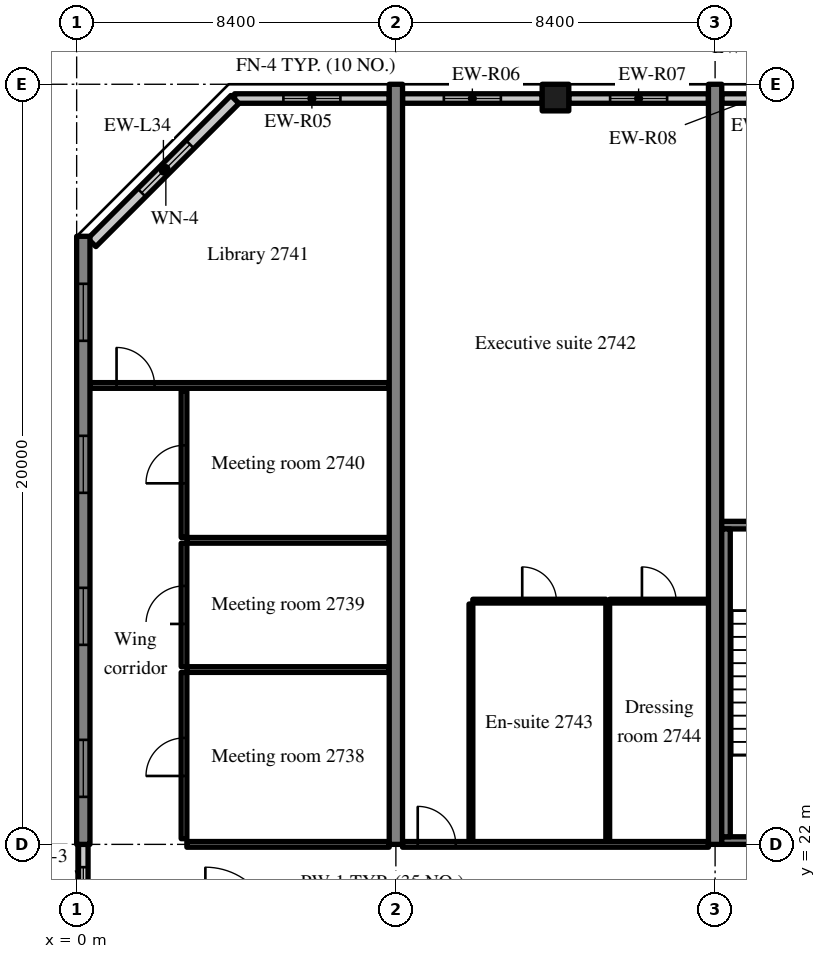
"""IFC4 building model, lengths in metres.
Left out: names, types, materials, properties, quantities, classifications, styles, units other than length and angle.
Written with IfcOpenShell. Run it as: python <this file> out.ifc"""

import sys

from ifc_helpers import new_model, si_unit, direction, frame, frame_2d, origin, origin_2d, place, context, subcontext, project, spatial, rectangle, extrude, source, transform, mapped, element, fill, save


model = new_model("IFC4")
c1 = context("Model", 3, precision=1e-05, world=origin(), true_north=direction((0.0, 1.0)))
c2 = subcontext(c1, "Body", "Model", "MODEL_VIEW")
j1 = project(units=[si_unit("LENGTHUNIT", "METRE"), si_unit("PLANEANGLEUNIT", "RADIAN")], contexts=[c1])
p1 = place(None, origin())
s1 = spatial("IfcSite", under=j1, at=p1, CompositionType="ELEMENT")
p2 = place(p1, origin())
s2 = spatial("IfcBuilding", under=s1, at=p2, CompositionType="ELEMENT")
p3 = place(p2, frame((0.0, 0.0, 114.2)))
s3 = spatial("IfcBuildingStorey", under=s2, at=p3, CompositionType="ELEMENT", Elevation=114.2)
m1 = source(origin(), c2, "Body", "SweptSolid", [
    extrude(rectangle(XDim=16.0, YDim=0.35, at=frame_2d((8.0, 0.0))), origin(), (0.0, 0.0, 1.0), 3.52),
])
p4 = place(p3, frame((0.175, 22.0, 0.0), z_axis=(0.0, 0.0, 1.0), x_axis=(0.0, 1.0, 0.0)))
e1 = element("IfcWall", 1, at=p4, inside=s3, PredefinedType="SHEAR", context=c2, shape_type="MappedRepresentation", body=[
    mapped(m1, transform((0.0, 0.0, 0.0), scale=1.0)),
])
m2 = source(origin(), c2, "Body", "SweptSolid", [
    extrude(rectangle(XDim=1.5, YDim=1.5, at=frame_2d((0.75, 0.75))), frame((0.0, 0.185, 0.0), z_axis=(0.0, -1.0, 0.0), x_axis=(1.0, 0.0, 0.0)), (0.0, 0.0, 1.0), 0.37),
])
p5 = place(p4, frame((1.25, 0.0, 0.9)))
e2 = element("IfcOpeningElement", 2, at=p5, cuts=e1, PredefinedType="OPENING", context=c2, shape_type="MappedRepresentation", body=[
    mapped(m2, transform((0.0, 0.0, 0.0), scale=1.0)),
])
p6 = place(p4, frame((5.25, 0.0, 0.9)))
e3 = element("IfcOpeningElement", 3, at=p6, cuts=e1, PredefinedType="OPENING", context=c2, shape_type="MappedRepresentation", body=[
    mapped(m2, transform((0.0, 0.0, 0.0), scale=1.0)),
])
p7 = place(p4, frame((9.25, 0.0, 0.9)))
e4 = element("IfcOpeningElement", 4, at=p7, cuts=e1, PredefinedType="OPENING", context=c2, shape_type="MappedRepresentation", body=[
    mapped(m2, transform((0.0, 0.0, 0.0), scale=1.0)),
])
p8 = place(p4, frame((13.25, 0.0, 0.9)))
e5 = element("IfcOpeningElement", 5, at=p8, cuts=e1, PredefinedType="OPENING", context=c2, shape_type="MappedRepresentation", body=[
    mapped(m2, transform((0.0, 0.0, 0.0), scale=1.0)),
])
m3 = source(origin(), c2, "Body", "SweptSolid", [
    extrude(rectangle(XDim=20.0, YDim=0.35, at=frame_2d((10.0, 0.0))), origin(), (0.0, 0.0, 1.0), 3.52),
])
for number, where, z_axis, x_axis in (
    (6, (8.4, 22.0, 0.0), (0.0, 0.0, 1.0), (0.0, 1.0, 0.0)),
    (7, (16.8, 22.0, 0.0), (0.0, 0.0, 1.0), (0.0, 1.0, 0.0)),
):
    element("IfcWall", number, at=place(p3, frame(where, z_axis=z_axis, x_axis=x_axis)), inside=s3, PredefinedType="SHEAR", context=c2, shape_type="MappedRepresentation", body=[
        mapped(m3, transform((0.0, 0.0, 0.0), scale=1.0)),
    ])
m4 = source(origin(), c2, "Body", "SweptSolid", [
    extrude(rectangle(XDim=0.7, YDim=0.7, at=origin_2d()), origin(), (0.0, 0.0, 1.0), 3.52),
])
p9 = place(p3, frame((12.6, 41.65, 0.0), z_axis=(0.0, 0.0, 1.0), x_axis=(1.0, 0.0, 0.0)))
e8 = element("IfcColumn", 8, at=p9, inside=s3, PredefinedType="COLUMN", context=c2, shape_type="MappedRepresentation", body=[
    mapped(m4, transform((0.0, 0.0, 0.0), scale=1.0)),
])
m5 = source(origin(), c2, "Body", "SweptSolid", [
    extrude(rectangle(XDim=4.07, YDim=0.25, at=frame_2d((2.035, 0.0))), origin(), (0.0, 0.0, 1.0), 2.82),
])
p10 = place(p3, frame((8.225, 41.625, 0.0), z_axis=(0.0, 0.0, 1.0), x_axis=(-1.0, 0.0, 0.0)))
e9 = element("IfcWall", 9, at=p10, inside=s3, PredefinedType="SOLIDWALL", context=c2, shape_type="MappedRepresentation", body=[
    mapped(m5, transform((0.0, 0.0, 0.0), scale=1.0)),
])
m6 = source(origin(), c2, "Body", "SweptSolid", [
    extrude(rectangle(XDim=1.5, YDim=1.5, at=frame_2d((0.75, 0.75))), frame((0.0, 0.135, 0.0), z_axis=(0.0, -1.0, 0.0), x_axis=(1.0, 0.0, 0.0)), (0.0, 0.0, 1.0), 0.27),
])
p11 = place(p10, frame((1.285, 0.0, 0.9)))
e10 = element("IfcOpeningElement", 10, at=p11, cuts=e9, PredefinedType="OPENING", context=c2, shape_type="MappedRepresentation", body=[
    mapped(m6, transform((0.0, 0.0, 0.0), scale=1.0)),
])
m7 = source(origin(), c2, "Body", "SweptSolid", [
    extrude(rectangle(XDim=3.675, YDim=0.25, at=frame_2d((1.837, 0.0))), origin(), (0.0, 0.0, 1.0), 2.82),
])
p12 = place(p3, frame((12.25, 41.625, 0.0), z_axis=(0.0, 0.0, 1.0), x_axis=(-1.0, 0.0, 0.0)))
e11 = element("IfcWall", 11, at=p12, inside=s3, PredefinedType="SOLIDWALL", context=c2, shape_type="MappedRepresentation", body=[
    mapped(m7, transform((0.0, 0.0, 0.0), scale=1.0)),
])
p13 = place(p12, frame((1.087, 0.0, 0.9)))
e12 = element("IfcOpeningElement", 12, at=p13, cuts=e11, PredefinedType="OPENING", context=c2, shape_type="MappedRepresentation", body=[
    mapped(m6, transform((0.0, 0.0, 0.0), scale=1.0)),
])
p14 = place(p3, frame((16.625, 41.625, 0.0), z_axis=(0.0, 0.0, 1.0), x_axis=(-1.0, 0.0, 0.0)))
e13 = element("IfcWall", 13, at=p14, inside=s3, PredefinedType="SOLIDWALL", context=c2, shape_type="MappedRepresentation", body=[
    mapped(m7, transform((0.0, 0.0, 0.0), scale=1.0)),
])
p15 = place(p14, frame((1.087, 0.0, 0.9)))
e14 = element("IfcOpeningElement", 14, at=p15, cuts=e13, PredefinedType="OPENING", context=c2, shape_type="MappedRepresentation", body=[
    mapped(m6, transform((0.0, 0.0, 0.0), scale=1.0)),
])
m8 = source(origin(), c2, "Body", "SweptSolid", [
    extrude(rectangle(XDim=1.683, YDim=0.25, at=frame_2d((0.841, 0.0))), origin(), (0.0, 0.0, 1.0), 2.82),
])
p16 = place(p3, frame((18.658, 41.625, 0.0), z_axis=(0.0, 0.0, 1.0), x_axis=(-1.0, 0.0, 0.0)))
e15 = element("IfcWall", 15, at=p16, inside=s3, PredefinedType="SOLIDWALL", context=c2, shape_type="MappedRepresentation", body=[
    mapped(m8, transform((0.0, 0.0, 0.0), scale=1.0)),
])
m9 = source(origin(), c2, "Body", "SweptSolid", [
    extrude(rectangle(XDim=5.326, YDim=0.3, at=frame_2d((2.663, 0.0))), origin(), (0.0, 0.0, 1.0), 3.52),
])
p17 = place(p3, frame((4.166, 41.6, 0.0), z_axis=(0.0, 0.0, 1.0), x_axis=(-0.707106781187, -0.707106781187, 0.0)))
e16 = element("IfcWall", 16, at=p17, inside=s3, PredefinedType="SOLIDWALL", context=c2, shape_type="MappedRepresentation", body=[
    mapped(m9, transform((0.0, 0.0, 0.0), scale=1.0)),
])
m10 = source(origin(), c2, "Body", "SweptSolid", [
    extrude(rectangle(XDim=1.8, YDim=1.5, at=frame_2d((0.9, 0.75))), frame((0.0, 0.16, 0.0), z_axis=(0.0, -1.0, 0.0), x_axis=(1.0, 0.0, 0.0)), (0.0, 0.0, 1.0), 0.32),
])
p18 = place(p17, frame((1.672, 0.0, 0.9)))
e17 = element("IfcOpeningElement", 17, at=p18, cuts=e16, PredefinedType="OPENING", context=c2, shape_type="MappedRepresentation", body=[
    mapped(m10, transform((0.0, 0.0, 0.0), scale=1.0)),
])
m11 = source(origin(), c2, "Body", "SweptSolid", [
    extrude(rectangle(XDim=2.4, YDim=0.25, at=frame_2d((1.2, 0.0))), origin(), (0.0, 0.0, 1.0), 2.62),
])
p19 = place(p3, frame((0.175, 19.6, 0.0), z_axis=(0.0, 0.0, 1.0), x_axis=(0.0, 1.0, 0.0)))
e18 = element("IfcWall", 18, at=p19, inside=s3, PredefinedType="SOLIDWALL", context=c2, shape_type="MappedRepresentation", body=[
    mapped(m11, transform((0.0, 0.0, 0.0), scale=1.0)),
])
m12 = source(origin(), c2, "Body", "SweptSolid", [
    extrude(rectangle(XDim=1.2, YDim=1.5, at=frame_2d((0.6, 0.75))), frame((0.0, 0.135, 0.0), z_axis=(0.0, -1.0, 0.0), x_axis=(1.0, 0.0, 0.0)), (0.0, 0.0, 1.0), 0.27),
])
p20 = place(p19, frame((0.6, 0.0, 0.9)))
e19 = element("IfcOpeningElement", 19, at=p20, cuts=e18, PredefinedType="OPENING", context=c2, shape_type="MappedRepresentation", body=[
    mapped(m12, transform((0.0, 0.0, 0.0), scale=1.0)),
])
m13 = source(origin(), c2, "Body", "SweptSolid", [
    extrude(rectangle(XDim=8.225, YDim=0.2, at=frame_2d((4.112, 0.0))), origin(), (0.0, 0.0, 1.0), 3.52),
])
p21 = place(p3, frame((16.975, 22.1, 0.0), z_axis=(0.0, 0.0, 1.0), x_axis=(1.0, 0.0, 0.0)))
e20 = element("IfcWall", 20, at=p21, inside=s3, PredefinedType="SOLIDWALL", context=c2, shape_type="MappedRepresentation", body=[
    mapped(m13, transform((0.0, 0.0, 0.0), scale=1.0)),
])
m14 = source(origin(), c2, "Body", "SweptSolid", [
    extrude(rectangle(XDim=1.2, YDim=2.1, at=frame_2d((0.6, 1.05))), frame((0.0, 0.11, 0.0), z_axis=(0.0, -1.0, 0.0), x_axis=(1.0, 0.0, 0.0)), (0.0, 0.0, 1.0), 0.22),
])
p22 = place(p21, frame((6.025, 0.0, 0.0)))
e21 = element("IfcOpeningElement", 21, at=p22, cuts=e20, PredefinedType="OPENING", context=c2, shape_type="MappedRepresentation", body=[
    mapped(m14, transform((0.0, 0.0, 0.0), scale=1.0)),
])
p23 = place(p3, frame((16.975, 30.4, 0.0), z_axis=(0.0, 0.0, 1.0), x_axis=(1.0, 0.0, 0.0)))
e22 = element("IfcWall", 22, at=p23, inside=s3, PredefinedType="SOLIDWALL", context=c2, shape_type="MappedRepresentation", body=[
    mapped(m13, transform((0.0, 0.0, 0.0), scale=1.0)),
])
m15 = source(origin(), c2, "Body", "SweptSolid", [
    extrude(rectangle(XDim=1.0, YDim=2.1, at=frame_2d((0.5, 1.05))), frame((0.0, 0.11, 0.0), z_axis=(0.0, -1.0, 0.0), x_axis=(1.0, 0.0, 0.0)), (0.0, 0.0, 1.0), 0.22),
])
p24 = place(p23, frame((6.125, 0.0, 0.0)))
e23 = element("IfcOpeningElement", 23, at=p24, cuts=e22, PredefinedType="OPENING", context=c2, shape_type="MappedRepresentation", body=[
    mapped(m15, transform((0.0, 0.0, 0.0), scale=1.0)),
])
m16 = source(origin(), c2, "Body", "SweptSolid", [
    extrude(rectangle(XDim=8.1, YDim=0.225, at=frame_2d((4.05, 0.0))), origin(), (0.0, 0.0, 1.0), 3.52),
])
p25 = place(p3, frame((17.087, 22.2, 0.0), z_axis=(0.0, 0.0, 1.0), x_axis=(0.0, 1.0, 0.0)))
e24 = element("IfcWall", 24, at=p25, inside=s3, PredefinedType="SOLIDWALL", context=c2, shape_type="MappedRepresentation", body=[
    mapped(m16, transform((0.0, 0.0, 0.0), scale=1.0)),
])
m17 = source(origin(), c2, "Body", "SweptSolid", [
    extrude(rectangle(XDim=5.325, YDim=0.15, at=frame_2d((2.663, 0.0))), origin(), (0.0, 0.0, 1.0), 2.82),
])
p26 = place(p3, frame((2.9, 22.0, 0.0), z_axis=(0.0, 0.0, 1.0), x_axis=(1.0, 0.0, 0.0)))
e25 = element("IfcWall", 25, at=p26, inside=s3, PredefinedType="PARTITIONING", context=c2, shape_type="MappedRepresentation", body=[
    mapped(m17, transform((0.0, 0.0, 0.0), scale=1.0)),
])
m18 = source(origin(), c2, "Body", "SweptSolid", [
    extrude(rectangle(XDim=4.375, YDim=0.15, at=frame_2d((2.188, 0.0))), origin(), (0.0, 0.0, 1.0), 3.52),
])
p27 = place(p3, frame((2.825, 22.15, 0.0), z_axis=(0.0, 0.0, 1.0), x_axis=(0.0, 1.0, 0.0)))
e26 = element("IfcWall", 26, at=p27, inside=s3, PredefinedType="PARTITIONING", context=c2, shape_type="MappedRepresentation", body=[
    mapped(m18, transform((0.0, 0.0, 0.0), scale=1.0)),
])
m19 = source(origin(), c2, "Body", "SweptSolid", [
    extrude(rectangle(XDim=1.0, YDim=2.1, at=frame_2d((0.5, 1.05))), frame((0.0, 0.085, 0.0), z_axis=(0.0, -1.0, 0.0), x_axis=(1.0, 0.0, 0.0)), (0.0, 0.0, 1.0), 0.17),
])
p28 = place(p27, frame((1.65, 0.0, 0.0)))
e27 = element("IfcOpeningElement", 27, at=p28, cuts=e26, PredefinedType="OPENING", context=c2, shape_type="MappedRepresentation", body=[
    mapped(m19, transform((0.0, 0.0, 0.0), scale=1.0)),
])
m20 = source(origin(), c2, "Body", "SweptSolid", [
    extrude(rectangle(XDim=5.325, YDim=0.15, at=frame_2d((2.663, 0.0))), origin(), (0.0, 0.0, 1.0), 3.52),
])
p29 = place(p3, frame((2.9, 26.6, 0.0), z_axis=(0.0, 0.0, 1.0), x_axis=(1.0, 0.0, 0.0)))
e28 = element("IfcWall", 28, at=p29, inside=s3, PredefinedType="PARTITIONING", context=c2, shape_type="MappedRepresentation", body=[
    mapped(m20, transform((0.0, 0.0, 0.0), scale=1.0)),
])
m21 = source(origin(), c2, "Body", "SweptSolid", [
    extrude(rectangle(XDim=3.25, YDim=0.15, at=frame_2d((1.625, 0.0))), origin(), (0.0, 0.0, 1.0), 3.52),
])
p30 = place(p3, frame((2.825, 26.675, 0.0), z_axis=(0.0, 0.0, 1.0), x_axis=(0.0, 1.0, 0.0)))
e29 = element("IfcWall", 29, at=p30, inside=s3, PredefinedType="PARTITIONING", context=c2, shape_type="MappedRepresentation", body=[
    mapped(m21, transform((0.0, 0.0, 0.0), scale=1.0)),
])
p31 = place(p30, frame((1.125, 0.0, 0.0)))
e30 = element("IfcOpeningElement", 30, at=p31, cuts=e29, PredefinedType="OPENING", context=c2, shape_type="MappedRepresentation", body=[
    mapped(m19, transform((0.0, 0.0, 0.0), scale=1.0)),
])
p32 = place(p3, frame((2.9, 30.0, 0.0), z_axis=(0.0, 0.0, 1.0), x_axis=(1.0, 0.0, 0.0)))
e31 = element("IfcWall", 31, at=p32, inside=s3, PredefinedType="PARTITIONING", context=c2, shape_type="MappedRepresentation", body=[
    mapped(m20, transform((0.0, 0.0, 0.0), scale=1.0)),
])
m22 = source(origin(), c2, "Body", "SweptSolid", [
    extrude(rectangle(XDim=3.85, YDim=0.15, at=frame_2d((1.925, 0.0))), origin(), (0.0, 0.0, 1.0), 3.52),
])
p33 = place(p3, frame((2.825, 30.075, 0.0), z_axis=(0.0, 0.0, 1.0), x_axis=(0.0, 1.0, 0.0)))
e32 = element("IfcWall", 32, at=p33, inside=s3, PredefinedType="PARTITIONING", context=c2, shape_type="MappedRepresentation", body=[
    mapped(m22, transform((0.0, 0.0, 0.0), scale=1.0)),
])
p34 = place(p33, frame((1.425, 0.0, 0.0)))
e33 = element("IfcOpeningElement", 33, at=p34, cuts=e32, PredefinedType="OPENING", context=c2, shape_type="MappedRepresentation", body=[
    mapped(m19, transform((0.0, 0.0, 0.0), scale=1.0)),
])
m23 = source(origin(), c2, "Body", "SweptSolid", [
    extrude(rectangle(XDim=7.875, YDim=0.15, at=frame_2d((3.938, 0.0))), origin(), (0.0, 0.0, 1.0), 3.52),
])
p35 = place(p3, frame((0.35, 34.075, 0.0), z_axis=(0.0, 0.0, 1.0), x_axis=(1.0, 0.0, 0.0)))
e34 = element("IfcWall", 34, at=p35, inside=s3, PredefinedType="PARTITIONING", context=c2, shape_type="MappedRepresentation", body=[
    mapped(m23, transform((0.0, 0.0, 0.0), scale=1.0)),
])
p36 = place(p35, frame((0.7, 0.0, 0.0)))
e35 = element("IfcOpeningElement", 35, at=p36, cuts=e34, PredefinedType="OPENING", context=c2, shape_type="MappedRepresentation", body=[
    mapped(m19, transform((0.0, 0.0, 0.0), scale=1.0)),
])
m24 = source(origin(), c2, "Body", "SweptSolid", [
    extrude(rectangle(XDim=6.25, YDim=0.1, at=frame_2d((3.125, 0.0))), origin(), (0.0, 0.0, 1.0), 3.52),
])
for number, where, z_axis, x_axis in (
    (36, (10.375, 22.075, 0.0), (0.0, 0.0, 1.0), (0.0, 1.0, 0.0)),
    (37, (13.975, 22.075, 0.0), (0.0, 0.0, 1.0), (0.0, 1.0, 0.0)),
):
    element("IfcWall", number, at=place(p3, frame(where, z_axis=z_axis, x_axis=x_axis)), inside=s3, PredefinedType="PARTITIONING", context=c2, shape_type="MappedRepresentation", body=[
        mapped(m24, transform((0.0, 0.0, 0.0), scale=1.0)),
    ])
m25 = source(origin(), c2, "Body", "SweptSolid", [
    extrude(rectangle(XDim=3.5, YDim=0.1, at=frame_2d((1.75, 0.0))), origin(), (0.0, 0.0, 1.0), 3.52),
])
p37 = place(p3, frame((10.425, 28.4, 0.0), z_axis=(0.0, 0.0, 1.0), x_axis=(1.0, 0.0, 0.0)))
e38 = element("IfcWall", 38, at=p37, inside=s3, PredefinedType="PARTITIONING", context=c2, shape_type="MappedRepresentation", body=[
    mapped(m25, transform((0.0, 0.0, 0.0), scale=1.0)),
])
m26 = source(origin(), c2, "Body", "SweptSolid", [
    extrude(rectangle(XDim=0.9, YDim=2.1, at=frame_2d((0.45, 1.05))), frame((0.0, 0.06, 0.0), z_axis=(0.0, -1.0, 0.0), x_axis=(1.0, 0.0, 0.0)), (0.0, 0.0, 1.0), 0.12),
])
p38 = place(p37, frame((1.3, 0.0, 0.0)))
e39 = element("IfcOpeningElement", 39, at=p38, cuts=e38, PredefinedType="OPENING", context=c2, shape_type="MappedRepresentation", body=[
    mapped(m26, transform((0.0, 0.0, 0.0), scale=1.0)),
])
m27 = source(origin(), c2, "Body", "SweptSolid", [
    extrude(rectangle(XDim=2.6, YDim=0.1, at=frame_2d((1.3, 0.0))), origin(), (0.0, 0.0, 1.0), 3.52),
])
p39 = place(p3, frame((14.025, 28.4, 0.0), z_axis=(0.0, 0.0, 1.0), x_axis=(1.0, 0.0, 0.0)))
e40 = element("IfcWall", 40, at=p39, inside=s3, PredefinedType="PARTITIONING", context=c2, shape_type="MappedRepresentation", body=[
    mapped(m27, transform((0.0, 0.0, 0.0), scale=1.0)),
])
p40 = place(p39, frame((0.85, 0.0, 0.0)))
e41 = element("IfcOpeningElement", 41, at=p40, cuts=e40, PredefinedType="OPENING", context=c2, shape_type="MappedRepresentation", body=[
    mapped(m26, transform((0.0, 0.0, 0.0), scale=1.0)),
])
m28 = source(origin(), c2, "Body", "SweptSolid", [
    extrude(rectangle(XDim=8.05, YDim=0.15, at=frame_2d((4.025, 0.0))), origin(), (0.0, 0.0, 1.0), 2.82),
])
p41 = place(p3, frame((8.575, 22.0, 0.0), z_axis=(0.0, 0.0, 1.0), x_axis=(1.0, 0.0, 0.0)))
e42 = element("IfcWall", 42, at=p41, inside=s3, PredefinedType="PARTITIONING", context=c2, shape_type="MappedRepresentation", body=[
    mapped(m28, transform((0.0, 0.0, 0.0), scale=1.0)),
])
p42 = place(p41, frame((0.4, 0.0, 0.0)))
e43 = element("IfcOpeningElement", 43, at=p42, cuts=e42, PredefinedType="OPENING", context=c2, shape_type="MappedRepresentation", body=[
    mapped(m19, transform((0.0, 0.0, 0.0), scale=1.0)),
])
m29 = source(origin(), c2, "Body", "SweptSolid", [
    extrude(rectangle(XDim=1.5, YDim=1.5, at=frame_2d((0.75, 0.75))), frame((0.0, 0.03, 0.0), z_axis=(0.0, -1.0, 0.0), x_axis=(1.0, 0.0, 0.0)), (0.0, 0.0, 1.0), 0.06),
])
p43 = place(p11, origin())
e44 = element("IfcWindow", 44, at=p43, inside=s3, PartitioningType="SINGLE_PANEL", PredefinedType="WINDOW", context=c2, shape_type="MappedRepresentation", body=[
    mapped(m29, transform((0.0, 0.0, 0.0), scale=1.0)),
])
fill(e10, e44)
p44 = place(p13, origin())
e45 = element("IfcWindow", 45, at=p44, inside=s3, PartitioningType="SINGLE_PANEL", PredefinedType="WINDOW", context=c2, shape_type="MappedRepresentation", body=[
    mapped(m29, transform((0.0, 0.0, 0.0), scale=1.0)),
])
fill(e12, e45)
p45 = place(p15, origin())
e46 = element("IfcWindow", 46, at=p45, inside=s3, PartitioningType="SINGLE_PANEL", PredefinedType="WINDOW", context=c2, shape_type="MappedRepresentation", body=[
    mapped(m29, transform((0.0, 0.0, 0.0), scale=1.0)),
])
fill(e14, e46)
m30 = source(origin(), c2, "Body", "SweptSolid", [
    extrude(rectangle(XDim=1.8, YDim=1.5, at=frame_2d((0.9, 0.75))), frame((0.0, 0.03, 0.0), z_axis=(0.0, -1.0, 0.0), x_axis=(1.0, 0.0, 0.0)), (0.0, 0.0, 1.0), 0.06),
])
p46 = place(p18, origin())
e47 = element("IfcWindow", 47, at=p46, inside=s3, PartitioningType="SINGLE_PANEL", PredefinedType="WINDOW", context=c2, shape_type="MappedRepresentation", body=[
    mapped(m30, transform((0.0, 0.0, 0.0), scale=1.0)),
])
fill(e17, e47)
p47 = place(p5, origin())
e48 = element("IfcWindow", 48, at=p47, inside=s3, PartitioningType="SINGLE_PANEL", PredefinedType="WINDOW", context=c2, shape_type="MappedRepresentation", body=[
    mapped(m29, transform((0.0, 0.0, 0.0), scale=1.0)),
])
fill(e2, e48)
p48 = place(p6, origin())
e49 = element("IfcWindow", 49, at=p48, inside=s3, PartitioningType="SINGLE_PANEL", PredefinedType="WINDOW", context=c2, shape_type="MappedRepresentation", body=[
    mapped(m29, transform((0.0, 0.0, 0.0), scale=1.0)),
])
fill(e3, e49)
p49 = place(p7, origin())
e50 = element("IfcWindow", 50, at=p49, inside=s3, PartitioningType="SINGLE_PANEL", PredefinedType="WINDOW", context=c2, shape_type="MappedRepresentation", body=[
    mapped(m29, transform((0.0, 0.0, 0.0), scale=1.0)),
])
fill(e4, e50)
p50 = place(p8, origin())
e51 = element("IfcWindow", 51, at=p50, inside=s3, PartitioningType="SINGLE_PANEL", PredefinedType="WINDOW", context=c2, shape_type="MappedRepresentation", body=[
    mapped(m29, transform((0.0, 0.0, 0.0), scale=1.0)),
])
fill(e5, e51)
m31 = source(origin(), c2, "Body", "SweptSolid", [
    extrude(rectangle(XDim=1.2, YDim=1.5, at=frame_2d((0.6, 0.75))), frame((0.0, 0.03, 0.0), z_axis=(0.0, -1.0, 0.0), x_axis=(1.0, 0.0, 0.0)), (0.0, 0.0, 1.0), 0.06),
])
p51 = place(p20, origin())
e52 = element("IfcWindow", 52, at=p51, inside=s3, PartitioningType="SINGLE_PANEL", PredefinedType="WINDOW", context=c2, shape_type="MappedRepresentation", body=[
    mapped(m31, transform((0.0, 0.0, 0.0), scale=1.0)),
])
fill(e19, e52)
m32 = source(origin(), c2, "Body", "SweptSolid", [
    extrude(rectangle(XDim=1.0, YDim=2.1, at=frame_2d((0.5, 1.05))), frame((0.0, 0.025, 0.0), z_axis=(0.0, -1.0, 0.0), x_axis=(1.0, 0.0, 0.0)), (0.0, 0.0, 1.0), 0.05),
])
p52 = place(p28, origin())
e53 = element("IfcDoor", 53, at=p52, inside=s3, OperationType="SINGLE_SWING_LEFT", PredefinedType="DOOR", context=c2, shape_type="MappedRepresentation", body=[
    mapped(m32, transform((0.0, 0.0, 0.0), scale=1.0)),
])
fill(e27, e53)
p53 = place(p31, origin())
e54 = element("IfcDoor", 54, at=p53, inside=s3, OperationType="SINGLE_SWING_LEFT", PredefinedType="DOOR", context=c2, shape_type="MappedRepresentation", body=[
    mapped(m32, transform((0.0, 0.0, 0.0), scale=1.0)),
])
fill(e30, e54)
p54 = place(p34, origin())
e55 = element("IfcDoor", 55, at=p54, inside=s3, OperationType="SINGLE_SWING_LEFT", PredefinedType="DOOR", context=c2, shape_type="MappedRepresentation", body=[
    mapped(m32, transform((0.0, 0.0, 0.0), scale=1.0)),
])
fill(e33, e55)
p55 = place(p36, origin())
e56 = element("IfcDoor", 56, at=p55, inside=s3, OperationType="SINGLE_SWING_LEFT", PredefinedType="DOOR", context=c2, shape_type="MappedRepresentation", body=[
    mapped(m32, transform((0.0, 0.0, 0.0), scale=1.0)),
])
fill(e35, e56)
m33 = source(origin(), c2, "Body", "SweptSolid", [
    extrude(rectangle(XDim=0.9, YDim=2.1, at=frame_2d((0.45, 1.05))), frame((0.0, 0.025, 0.0), z_axis=(0.0, -1.0, 0.0), x_axis=(1.0, 0.0, 0.0)), (0.0, 0.0, 1.0), 0.05),
])
p56 = place(p38, origin())
e57 = element("IfcDoor", 57, at=p56, inside=s3, OperationType="SINGLE_SWING_LEFT", PredefinedType="DOOR", context=c2, shape_type="MappedRepresentation", body=[
    mapped(m33, transform((0.0, 0.0, 0.0), scale=1.0)),
])
fill(e39, e57)
p57 = place(p40, origin())
e58 = element("IfcDoor", 58, at=p57, inside=s3, OperationType="SINGLE_SWING_LEFT", PredefinedType="DOOR", context=c2, shape_type="MappedRepresentation", body=[
    mapped(m33, transform((0.0, 0.0, 0.0), scale=1.0)),
])
fill(e41, e58)
p58 = place(p42, origin())
e59 = element("IfcDoor", 59, at=p58, inside=s3, OperationType="SINGLE_SWING_LEFT", PredefinedType="DOOR", context=c2, shape_type="MappedRepresentation", body=[
    mapped(m32, transform((0.0, 0.0, 0.0), scale=1.0)),
])
fill(e43, e59)
save(model, sys.argv[1])
